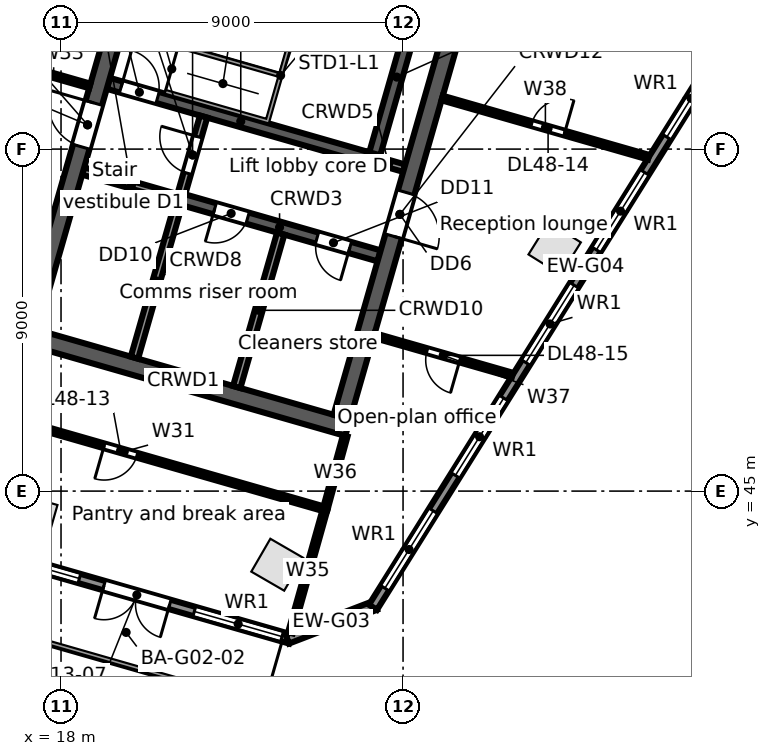
"""IFC4 building model, lengths in metres.
Left out: names, types, materials, properties, quantities, classifications, styles, units other than length and angle.
Written with IfcOpenShell. Run it as: python <this file> out.ifc"""

import sys

from ifc_helpers import new_model, si_unit, direction, frame, frame_2d, origin, origin_2d, place, context, subcontext, project, spatial, rectangle, extrude, element, fill, save


model = new_model("IFC4")
c1 = context("Model", 3, precision=1e-05, world=origin(), true_north=direction((0.0, 1.0)))
c2 = subcontext(c1, "Body", "Model", "MODEL_VIEW")
j1 = project(units=[si_unit("LENGTHUNIT", "METRE"), si_unit("PLANEANGLEUNIT", "RADIAN")], contexts=[c1])
p1 = place(None, origin())
s1 = spatial("IfcSite", under=j1, at=p1, CompositionType="ELEMENT")
p2 = place(p1, origin())
s2 = spatial("IfcBuilding", under=s1, at=p2, CompositionType="ELEMENT")
p3 = place(p2, frame((0.0, 0.0, 227.0)))
s3 = spatial("IfcBuildingStorey", under=s2, at=p3, CompositionType="ELEMENT", Elevation=227.0)
for number, where, z_axis, x_axis in (
    (1, (17.288, 44.291, 0.0), (0.0, 0.0, 1.0), (0.961, -0.276, 0.0)),
    (2, (23.69, 43.063, 0.0), (0.0, 0.0, 1.0), (-0.865, 0.501, 0.0)),
    (3, (30.99, 51.386, 0.0), (0.0, 0.0, 1.0), (0.53, 0.848, 0.0)),
):
    element("IfcColumn", number, at=place(p3, frame(where, z_axis=z_axis, x_axis=x_axis)), inside=s3, PredefinedType="COLUMN", context=c2, shape_type="SweptSolid", body=[
        extrude(rectangle(XDim=1.0, YDim=1.0, at=origin_2d()), origin(), (0.0, 0.0, 1.0), 3.9),
    ])
p4 = place(p3, frame((24.034, 41.108, 0.0), z_axis=(0.0, 0.0, 1.0), x_axis=(-0.96126060691, 0.275641153683, 0.0)))
e4 = element("IfcWall", 4, at=p4, inside=s3, PredefinedType="STANDARD", context=c2, shape_type="SweptSolid", body=[
    extrude(rectangle(XDim=24.951, YDim=0.25, at=frame_2d((12.475, 0.0))), origin(), (0.0, 0.0, 1.0), 3.55),
])
p5 = place(p4, frame((22.416, 0.0, 0.8)))
e5 = element("IfcOpeningElement", 5, at=p5, cuts=e4, PredefinedType="OPENING", context=c2, shape_type="SweptSolid", body=[
    extrude(rectangle(XDim=2.4, YDim=2.2, at=frame_2d((1.2, 1.1))), frame((0.0, 0.135, 0.0), z_axis=(0.0, -1.0, 0.0), x_axis=(1.0, 0.0, 0.0)), (0.0, 0.0, 1.0), 0.27),
])
p6 = place(p4, frame((19.643, 0.0, 0.8)))
e6 = element("IfcOpeningElement", 6, at=p6, cuts=e4, PredefinedType="OPENING", context=c2, shape_type="SweptSolid", body=[
    extrude(rectangle(XDim=2.4, YDim=2.2, at=frame_2d((1.2, 1.1))), frame((0.0, 0.135, 0.0), z_axis=(0.0, -1.0, 0.0), x_axis=(1.0, 0.0, 0.0)), (0.0, 0.0, 1.0), 0.27),
])
p7 = place(p4, frame((16.869, 0.0, 0.8)))
e7 = element("IfcOpeningElement", 7, at=p7, cuts=e4, PredefinedType="OPENING", context=c2, shape_type="SweptSolid", body=[
    extrude(rectangle(XDim=2.4, YDim=2.2, at=frame_2d((1.2, 1.1))), frame((0.0, 0.135, 0.0), z_axis=(0.0, -1.0, 0.0), x_axis=(1.0, 0.0, 0.0)), (0.0, 0.0, 1.0), 0.27),
])
p8 = place(p4, frame((14.096, 0.0, 0.8)))
e8 = element("IfcOpeningElement", 8, at=p8, cuts=e4, PredefinedType="OPENING", context=c2, shape_type="SweptSolid", body=[
    extrude(rectangle(XDim=2.4, YDim=2.2, at=frame_2d((1.2, 1.1))), frame((0.0, 0.135, 0.0), z_axis=(0.0, -1.0, 0.0), x_axis=(1.0, 0.0, 0.0)), (0.0, 0.0, 1.0), 0.27),
])
p9 = place(p4, frame((11.622, 0.0, 0.0)))
e9 = element("IfcOpeningElement", 9, at=p9, cuts=e4, PredefinedType="OPENING", context=c2, shape_type="SweptSolid", body=[
    extrude(rectangle(XDim=1.8, YDim=2.4, at=frame_2d((0.9, 1.2))), frame((0.0, 0.135, 0.0), z_axis=(0.0, -1.0, 0.0), x_axis=(1.0, 0.0, 0.0)), (0.0, 0.0, 1.0), 0.27),
])
p10 = place(p4, frame((8.549, 0.0, 0.8)))
e10 = element("IfcOpeningElement", 10, at=p10, cuts=e4, PredefinedType="OPENING", context=c2, shape_type="SweptSolid", body=[
    extrude(rectangle(XDim=2.4, YDim=2.2, at=frame_2d((1.2, 1.1))), frame((0.0, 0.135, 0.0), z_axis=(0.0, -1.0, 0.0), x_axis=(1.0, 0.0, 0.0)), (0.0, 0.0, 1.0), 0.27),
])
p11 = place(p4, frame((5.775, 0.0, 0.8)))
e11 = element("IfcOpeningElement", 11, at=p11, cuts=e4, PredefinedType="OPENING", context=c2, shape_type="SweptSolid", body=[
    extrude(rectangle(XDim=2.4, YDim=2.2, at=frame_2d((1.2, 1.1))), frame((0.0, 0.135, 0.0), z_axis=(0.0, -1.0, 0.0), x_axis=(1.0, 0.0, 0.0)), (0.0, 0.0, 1.0), 0.27),
])
p12 = place(p4, frame((3.302, 0.0, 0.0)))
e12 = element("IfcOpeningElement", 12, at=p12, cuts=e4, PredefinedType="OPENING", context=c2, shape_type="SweptSolid", body=[
    extrude(rectangle(XDim=1.8, YDim=2.4, at=frame_2d((0.9, 1.2))), frame((0.0, 0.135, 0.0), z_axis=(0.0, -1.0, 0.0), x_axis=(1.0, 0.0, 0.0)), (0.0, 0.0, 1.0), 0.27),
])
p13 = place(p4, frame((0.229, 0.0, 0.8)))
e13 = element("IfcOpeningElement", 13, at=p13, cuts=e4, PredefinedType="OPENING", context=c2, shape_type="SweptSolid", body=[
    extrude(rectangle(XDim=2.4, YDim=2.2, at=frame_2d((1.2, 1.1))), frame((0.0, 0.135, 0.0), z_axis=(0.0, -1.0, 0.0), x_axis=(1.0, 0.0, 0.0)), (0.0, 0.0, 1.0), 0.27),
])
p14 = place(p3, frame((26.27, 41.993, 0.0), z_axis=(0.0, 0.0, 1.0), x_axis=(-0.933573798066, -0.358385216722, 0.0)))
e14 = element("IfcWall", 14, at=p14, inside=s3, PredefinedType="STANDARD", context=c2, shape_type="SweptSolid", body=[
    extrude(rectangle(XDim=2.48, YDim=0.25, at=frame_2d((1.24, 0.0))), origin(), (0.0, 0.0, 1.0), 3.55),
])
p15 = place(p3, frame((37.392, 59.84, 0.0), z_axis=(0.0, 0.0, 1.0), x_axis=(-0.529919909431, -0.848047692992, 0.0)))
e15 = element("IfcWall", 15, at=p15, inside=s3, PredefinedType="STANDARD", context=c2, shape_type="SweptSolid", body=[
    extrude(rectangle(XDim=21.104, YDim=0.25, at=frame_2d((10.552, 0.0))), origin(), (0.0, 0.0, 1.0), 3.55),
])
p16 = place(p15, frame((18.112, 0.0, 0.8)))
e16 = element("IfcOpeningElement", 16, at=p16, cuts=e15, PredefinedType="OPENING", context=c2, shape_type="SweptSolid", body=[
    extrude(rectangle(XDim=2.4, YDim=2.2, at=frame_2d((1.2, 1.1))), frame((0.0, 0.135, 0.0), z_axis=(0.0, -1.0, 0.0), x_axis=(1.0, 0.0, 0.0)), (0.0, 0.0, 1.0), 0.27),
])
p17 = place(p15, frame((14.612, 0.0, 0.8)))
e17 = element("IfcOpeningElement", 17, at=p17, cuts=e15, PredefinedType="OPENING", context=c2, shape_type="SweptSolid", body=[
    extrude(rectangle(XDim=2.4, YDim=2.2, at=frame_2d((1.2, 1.1))), frame((0.0, 0.135, 0.0), z_axis=(0.0, -1.0, 0.0), x_axis=(1.0, 0.0, 0.0)), (0.0, 0.0, 1.0), 0.27),
])
p18 = place(p15, frame((11.112, 0.0, 0.8)))
e18 = element("IfcOpeningElement", 18, at=p18, cuts=e15, PredefinedType="OPENING", context=c2, shape_type="SweptSolid", body=[
    extrude(rectangle(XDim=2.4, YDim=2.2, at=frame_2d((1.2, 1.1))), frame((0.0, 0.135, 0.0), z_axis=(0.0, -1.0, 0.0), x_axis=(1.0, 0.0, 0.0)), (0.0, 0.0, 1.0), 0.27),
])
p19 = place(p15, frame((7.612, 0.0, 0.8)))
e19 = element("IfcOpeningElement", 19, at=p19, cuts=e15, PredefinedType="OPENING", context=c2, shape_type="SweptSolid", body=[
    extrude(rectangle(XDim=2.4, YDim=2.2, at=frame_2d((1.2, 1.1))), frame((0.0, 0.135, 0.0), z_axis=(0.0, -1.0, 0.0), x_axis=(1.0, 0.0, 0.0)), (0.0, 0.0, 1.0), 0.27),
])
p20 = place(p15, frame((4.112, 0.0, 0.8)))
e20 = element("IfcOpeningElement", 20, at=p20, cuts=e15, PredefinedType="OPENING", context=c2, shape_type="SweptSolid", body=[
    extrude(rectangle(XDim=2.4, YDim=2.2, at=frame_2d((1.2, 1.1))), frame((0.0, 0.135, 0.0), z_axis=(0.0, -1.0, 0.0), x_axis=(1.0, 0.0, 0.0)), (0.0, 0.0, 1.0), 0.27),
])
p21 = place(p15, frame((0.612, 0.0, 0.8)))
e21 = element("IfcOpeningElement", 21, at=p21, cuts=e15, PredefinedType="OPENING", context=c2, shape_type="SweptSolid", body=[
    extrude(rectangle(XDim=2.4, YDim=2.2, at=frame_2d((1.2, 1.1))), frame((0.0, 0.135, 0.0), z_axis=(0.0, -1.0, 0.0), x_axis=(1.0, 0.0, 0.0)), (0.0, 0.0, 1.0), 0.27),
])
p22 = place(p3, frame((16.89, 49.149, 0.0), z_axis=(0.0, 0.0, 1.0), x_axis=(0.96126248289, -0.275634611374, 0.0)))
e22 = element("IfcWall", 22, at=p22, inside=s3, PredefinedType="SOLIDWALL", context=c2, shape_type="SweptSolid", body=[
    extrude(rectangle(XDim=9.0, YDim=0.45, at=frame_2d((4.5, 0.0))), origin(), (0.0, 0.0, 1.0), 3.55),
])
p23 = place(p3, frame((18.583, 53.423, 0.0), z_axis=(0.0, 0.0, 1.0), x_axis=(0.961259287968, -0.275645753268, 0.0)))
e23 = element("IfcWall", 23, at=p23, inside=s3, PredefinedType="SOLIDWALL", context=c2, shape_type="SweptSolid", body=[
    extrude(rectangle(XDim=2.65, YDim=0.2, at=frame_2d((1.325, 0.0))), origin(), (0.0, 0.0, 1.0), 3.55),
])
p24 = place(p3, frame((21.131, 52.692, 0.0), z_axis=(0.0, 0.0, 1.0), x_axis=(0.961261488075, -0.275638080722, 0.0)))
e24 = element("IfcWall", 24, at=p24, inside=s3, PredefinedType="SOLIDWALL", context=c2, shape_type="SweptSolid", body=[
    extrude(rectangle(XDim=5.45, YDim=0.3, at=frame_2d((2.725, 0.0))), origin(), (0.0, 0.0, 1.0), 3.55),
])
p25 = place(p24, frame((0.95, 0.0, 0.0)))
e25 = element("IfcOpeningElement", 25, at=p25, cuts=e24, PredefinedType="OPENING", context=c2, shape_type="SweptSolid", body=[
    extrude(rectangle(XDim=0.9, YDim=2.1, at=frame_2d((0.45, 1.05))), frame((0.0, 0.16, 0.0), z_axis=(0.0, -1.0, 0.0), x_axis=(1.0, 0.0, 0.0)), (0.0, 0.0, 1.0), 0.32),
])
p26 = place(p24, frame((3.75, 0.0, 0.0)))
e26 = element("IfcOpeningElement", 26, at=p26, cuts=e24, PredefinedType="OPENING", context=c2, shape_type="SweptSolid", body=[
    extrude(rectangle(XDim=0.9, YDim=2.1, at=frame_2d((0.45, 1.05))), frame((0.0, 0.16, 0.0), z_axis=(0.0, -1.0, 0.0), x_axis=(1.0, 0.0, 0.0)), (0.0, 0.0, 1.0), 0.32),
])
p27 = place(p3, frame((19.245, 55.73, 0.0), z_axis=(0.0, 0.0, 1.0), x_axis=(0.961263007877, -0.275632780503, 0.0)))
e27 = element("IfcWall", 27, at=p27, inside=s3, PredefinedType="SOLIDWALL", context=c2, shape_type="SweptSolid", body=[
    extrude(rectangle(XDim=7.25, YDim=0.3, at=frame_2d((3.625, 0.0))), origin(), (0.0, 0.0, 1.0), 3.55),
])
p28 = place(p27, frame((0.35, 0.0, 0.0)))
e28 = element("IfcOpeningElement", 28, at=p28, cuts=e27, PredefinedType="OPENING", context=c2, shape_type="SweptSolid", body=[
    extrude(rectangle(XDim=1.0, YDim=2.1, at=frame_2d((0.5, 1.05))), frame((0.0, 0.16, 0.0), z_axis=(0.0, -1.0, 0.0), x_axis=(1.0, 0.0, 0.0)), (0.0, 0.0, 1.0), 0.32),
])
p29 = place(p3, frame((26.214, 53.732, 0.0), z_axis=(0.0, 0.0, 1.0), x_axis=(0.961241665642, -0.275707200184, 0.0)))
e29 = element("IfcWall", 29, at=p29, inside=s3, PredefinedType="SOLIDWALL", context=c2, shape_type="SweptSolid", body=[
    extrude(rectangle(XDim=0.85, YDim=0.2, at=frame_2d((0.425, 0.0))), origin(), (0.0, 0.0, 1.0), 3.55),
])
p30 = place(p3, frame((17.168, 49.303, 0.0), z_axis=(0.0, 0.0, 1.0), x_axis=(0.275638974822, 0.961261231695, 0.0)))
e30 = element("IfcWall", 30, at=p30, inside=s3, PredefinedType="SOLIDWALL", context=c2, shape_type="SweptSolid", body=[
    extrude(rectangle(XDim=11.1, YDim=0.45, at=frame_2d((5.55, 0.0))), origin(), (0.0, 0.0, 1.0), 3.55),
])
p31 = place(p30, frame((4.95, 0.0, 0.0)))
e31 = element("IfcOpeningElement", 31, at=p31, cuts=e30, PredefinedType="OPENING", context=c2, shape_type="SweptSolid", body=[
    extrude(rectangle(XDim=1.2, YDim=2.1, at=frame_2d((0.6, 1.05))), frame((0.0, 0.235, 0.0), z_axis=(0.0, -1.0, 0.0), x_axis=(1.0, 0.0, 0.0)), (0.0, 0.0, 1.0), 0.47),
])
p32 = place(p3, frame((19.932, 48.511, 0.0), z_axis=(0.0, 0.0, 1.0), x_axis=(0.275642273411, 0.961260285827, 0.0)))
e32 = element("IfcWall", 32, at=p32, inside=s3, PredefinedType="SOLIDWALL", context=c2, shape_type="SweptSolid", body=[
    extrude(rectangle(XDim=4.2, YDim=0.2, at=frame_2d((2.1, 0.0))), origin(), (0.0, 0.0, 1.0), 3.55),
])
p33 = place(p3, frame((21.172, 52.837, 0.0), z_axis=(0.0, 0.0, 1.0), x_axis=(0.275657676022, 0.961255868981, 0.0)))
e33 = element("IfcWall", 33, at=p33, inside=s3, PredefinedType="PARTITIONING", context=c2, shape_type="SweptSolid", body=[
    extrude(rectangle(XDim=2.1, YDim=0.2, at=frame_2d((1.05, 0.0))), origin(), (0.0, 0.0, 1.0), 3.55),
])
p34 = place(p33, frame((0.55, 0.0, 0.0)))
e34 = element("IfcOpeningElement", 34, at=p34, cuts=e33, PredefinedType="OPENING", context=c2, shape_type="SweptSolid", body=[
    extrude(rectangle(XDim=1.0, YDim=2.1, at=frame_2d((0.5, 1.05))), frame((0.0, 0.11, 0.0), z_axis=(0.0, -1.0, 0.0), x_axis=(1.0, 0.0, 0.0)), (0.0, 0.0, 1.0), 0.22),
])
p35 = place(p3, frame((22.623, 47.739, 0.0), z_axis=(0.0, 0.0, 1.0), x_axis=(0.275642273411, 0.961260285827, 0.0)))
e35 = element("IfcWall", 35, at=p35, inside=s3, PredefinedType="PARTITIONING", context=c2, shape_type="SweptSolid", body=[
    extrude(rectangle(XDim=4.2, YDim=0.2, at=frame_2d((2.1, 0.0))), origin(), (0.0, 0.0, 1.0), 3.55),
])
p36 = place(p3, frame((26.256, 53.876, 0.0), z_axis=(0.0, 0.0, 1.0), x_axis=(0.275588560745, 0.96127568636, 0.0)))
e36 = element("IfcWall", 36, at=p36, inside=s3, PredefinedType="SOLIDWALL", context=c2, shape_type="SweptSolid", body=[
    extrude(rectangle(XDim=4.2, YDim=0.3, at=frame_2d((2.1, 0.0))), origin(), (0.0, 0.0, 1.0), 3.55),
])
p37 = place(p3, frame((25.387, 46.947, 0.0), z_axis=(0.0, 0.0, 1.0), x_axis=(0.275638974822, 0.961261231695, 0.0)))
e37 = element("IfcWall", 37, at=p37, inside=s3, PredefinedType="SOLIDWALL", context=c2, shape_type="SweptSolid", body=[
    extrude(rectangle(XDim=11.1, YDim=0.45, at=frame_2d((5.55, 0.0))), origin(), (0.0, 0.0, 1.0), 3.55),
])
p38 = place(p37, frame((4.95, 0.0, 0.0)))
e38 = element("IfcOpeningElement", 38, at=p38, cuts=e37, PredefinedType="OPENING", context=c2, shape_type="SweptSolid", body=[
    extrude(rectangle(XDim=1.2, YDim=2.1, at=frame_2d((0.6, 1.05))), frame((0.0, 0.235, 0.0), z_axis=(0.0, -1.0, 0.0), x_axis=(1.0, 0.0, 0.0)), (0.0, 0.0, 1.0), 0.47),
])
p39 = place(p3, frame((14.377, 47.555, 0.0), z_axis=(0.0, 0.0, 1.0), x_axis=(0.961263044958, -0.275632651182, 0.0)))
e39 = element("IfcWall", 39, at=p39, inside=s3, PredefinedType="PARTITIONING", context=c2, shape_type="SweptSolid", body=[
    extrude(rectangle(XDim=11.0, YDim=0.125, at=frame_2d((5.5, 0.0))), origin(), (0.0, 0.0, 1.0), 2.822),
])
p40 = place(p39, frame((4.95, 0.0, 0.0)))
e40 = element("IfcOpeningElement", 40, at=p40, cuts=e39, PredefinedType="OPENING", context=c2, shape_type="SweptSolid", body=[
    extrude(rectangle(XDim=0.9, YDim=2.1, at=frame_2d((0.45, 1.05))), frame((0.0, 0.073, 0.0), z_axis=(0.0, -1.0, 0.0), x_axis=(1.0, 0.0, 0.0)), (0.0, 0.0, 1.0), 0.145),
])
p41 = place(p3, frame((16.857, 56.206, 0.0), z_axis=(0.0, 0.0, 1.0), x_axis=(0.961383985066, -0.275210525341, 0.0)))
e41 = element("IfcWall", 41, at=p41, inside=s3, PredefinedType="PARTITIONING", context=c2, shape_type="SweptSolid", body=[
    extrude(rectangle(XDim=1.977, YDim=0.125, at=frame_2d((0.988, 0.0))), origin(), (0.0, 0.0, 1.0), 3.55),
])
p42 = place(p3, frame((24.036, 41.27, 0.0), z_axis=(0.0, 0.0, 1.0), x_axis=(0.270787421954, 0.962639170256, 0.0)))
e42 = element("IfcWall", 42, at=p42, inside=s3, PredefinedType="PARTITIONING", context=c2, shape_type="SweptSolid", body=[
    extrude(rectangle(XDim=3.379, YDim=0.125, at=frame_2d((1.689, 0.0))), origin(), (0.0, 0.0, 1.0), 2.822),
])
p43 = place(p3, frame((24.951, 44.523, 0.0), z_axis=(0.0, 0.0, 1.0), x_axis=(0.264046927145, 0.964509834198, 0.0)))
e43 = element("IfcWall", 43, at=p43, inside=s3, PredefinedType="PARTITIONING", context=c2, shape_type="SweptSolid", body=[
    extrude(rectangle(XDim=2.0, YDim=0.125, at=frame_2d((1.0, 0.0))), origin(), (0.0, 0.0, 1.0), 2.822),
])
p44 = place(p3, frame((26.237, 49.096, 0.0), z_axis=(0.0, 0.0, 1.0), x_axis=(0.961285271066, -0.275555126304, 0.0)))
e44 = element("IfcWall", 44, at=p44, inside=s3, PredefinedType="PARTITIONING", context=c2, shape_type="SweptSolid", body=[
    extrude(rectangle(XDim=3.789, YDim=0.125, at=frame_2d((1.894, 0.0))), origin(), (0.0, 0.0, 1.0), 2.822),
])
p45 = place(p44, frame((1.45, 0.0, 0.0)))
e45 = element("IfcOpeningElement", 45, at=p45, cuts=e44, PredefinedType="OPENING", context=c2, shape_type="SweptSolid", body=[
    extrude(rectangle(XDim=0.9, YDim=2.1, at=frame_2d((0.45, 1.05))), frame((0.0, 0.073, 0.0), z_axis=(0.0, -1.0, 0.0), x_axis=(1.0, 0.0, 0.0)), (0.0, 0.0, 1.0), 0.145),
])
p46 = place(p3, frame((28.029, 55.344, 0.0), z_axis=(0.0, 0.0, 1.0), x_axis=(0.961249621014, -0.275679462603, 0.0)))
e46 = element("IfcWall", 46, at=p46, inside=s3, PredefinedType="PARTITIONING", context=c2, shape_type="SweptSolid", body=[
    extrude(rectangle(XDim=5.652, YDim=0.125, at=frame_2d((2.826, 0.0))), origin(), (0.0, 0.0, 1.0), 2.83),
])
p47 = place(p46, frame((2.45, 0.0, 0.0)))
e47 = element("IfcOpeningElement", 47, at=p47, cuts=e46, PredefinedType="OPENING", context=c2, shape_type="SweptSolid", body=[
    extrude(rectangle(XDim=0.9, YDim=2.1, at=frame_2d((0.45, 1.05))), frame((0.0, 0.073, 0.0), z_axis=(0.0, -1.0, 0.0), x_axis=(1.0, 0.0, 0.0)), (0.0, 0.0, 1.0), 0.145),
])
p48 = place(p11, origin())
e48 = element("IfcWindow", 48, at=p48, inside=s3, PartitioningType="SINGLE_PANEL", PredefinedType="WINDOW", context=c2, shape_type="SweptSolid", body=[
    extrude(rectangle(XDim=2.4, YDim=2.2, at=frame_2d((1.2, 1.1))), frame((0.0, 0.03, 0.0), z_axis=(0.0, -1.0, 0.0), x_axis=(1.0, 0.0, 0.0)), (0.0, 0.0, 1.0), 0.06),
])
fill(e11, e48)
p49 = place(p12, origin())
e49 = element("IfcDoor", 49, at=p49, inside=s3, OperationType="DOUBLE_DOOR_SINGLE_SWING", PredefinedType="DOOR", context=c2, shape_type="SweptSolid", body=[
    extrude(rectangle(XDim=1.8, YDim=2.4, at=frame_2d((0.9, 1.2))), frame((0.0, 0.025, 0.0), z_axis=(0.0, -1.0, 0.0), x_axis=(1.0, 0.0, 0.0)), (0.0, 0.0, 1.0), 0.05),
])
fill(e12, e49)
p50 = place(p13, origin())
e50 = element("IfcWindow", 50, at=p50, inside=s3, PartitioningType="SINGLE_PANEL", PredefinedType="WINDOW", context=c2, shape_type="SweptSolid", body=[
    extrude(rectangle(XDim=2.4, YDim=2.2, at=frame_2d((1.2, 1.1))), frame((0.0, 0.03, 0.0), z_axis=(0.0, -1.0, 0.0), x_axis=(1.0, 0.0, 0.0)), (0.0, 0.0, 1.0), 0.06),
])
fill(e13, e50)
p51 = place(p16, origin())
e51 = element("IfcWindow", 51, at=p51, inside=s3, PartitioningType="SINGLE_PANEL", PredefinedType="WINDOW", context=c2, shape_type="SweptSolid", body=[
    extrude(rectangle(XDim=2.4, YDim=2.2, at=frame_2d((1.2, 1.1))), frame((0.0, 0.03, 0.0), z_axis=(0.0, -1.0, 0.0), x_axis=(1.0, 0.0, 0.0)), (0.0, 0.0, 1.0), 0.06),
])
fill(e16, e51)
p52 = place(p17, origin())
e52 = element("IfcWindow", 52, at=p52, inside=s3, PartitioningType="SINGLE_PANEL", PredefinedType="WINDOW", context=c2, shape_type="SweptSolid", body=[
    extrude(rectangle(XDim=2.4, YDim=2.2, at=frame_2d((1.2, 1.1))), frame((0.0, 0.03, 0.0), z_axis=(0.0, -1.0, 0.0), x_axis=(1.0, 0.0, 0.0)), (0.0, 0.0, 1.0), 0.06),
])
fill(e17, e52)
p53 = place(p18, origin())
e53 = element("IfcWindow", 53, at=p53, inside=s3, PartitioningType="SINGLE_PANEL", PredefinedType="WINDOW", context=c2, shape_type="SweptSolid", body=[
    extrude(rectangle(XDim=2.4, YDim=2.2, at=frame_2d((1.2, 1.1))), frame((0.0, 0.03, 0.0), z_axis=(0.0, -1.0, 0.0), x_axis=(1.0, 0.0, 0.0)), (0.0, 0.0, 1.0), 0.06),
])
fill(e18, e53)
p54 = place(p19, origin())
e54 = element("IfcWindow", 54, at=p54, inside=s3, PartitioningType="SINGLE_PANEL", PredefinedType="WINDOW", context=c2, shape_type="SweptSolid", body=[
    extrude(rectangle(XDim=2.4, YDim=2.2, at=frame_2d((1.2, 1.1))), frame((0.0, 0.03, 0.0), z_axis=(0.0, -1.0, 0.0), x_axis=(1.0, 0.0, 0.0)), (0.0, 0.0, 1.0), 0.06),
])
fill(e19, e54)
p55 = place(p20, origin())
e55 = element("IfcWindow", 55, at=p55, inside=s3, PartitioningType="SINGLE_PANEL", PredefinedType="WINDOW", context=c2, shape_type="SweptSolid", body=[
    extrude(rectangle(XDim=2.4, YDim=2.2, at=frame_2d((1.2, 1.1))), frame((0.0, 0.03, 0.0), z_axis=(0.0, -1.0, 0.0), x_axis=(1.0, 0.0, 0.0)), (0.0, 0.0, 1.0), 0.06),
])
fill(e20, e55)
p56 = place(p28, origin())
e56 = element("IfcDoor", 56, at=p56, inside=s3, OperationType="SINGLE_SWING_LEFT", PredefinedType="DOOR", context=c2, shape_type="SweptSolid", body=[
    extrude(rectangle(XDim=1.0, YDim=2.1, at=frame_2d((0.5, 1.05))), frame((0.0, 0.025, 0.0), z_axis=(0.0, -1.0, 0.0), x_axis=(1.0, 0.0, 0.0)), (0.0, 0.0, 1.0), 0.05),
])
fill(e28, e56)
p57 = place(p34, origin())
e57 = element("IfcDoor", 57, at=p57, inside=s3, OperationType="SINGLE_SWING_RIGHT", PredefinedType="DOOR", context=c2, shape_type="SweptSolid", body=[
    extrude(rectangle(XDim=1.0, YDim=2.1, at=frame_2d((0.5, 1.05))), frame((0.0, 0.025, 0.0), z_axis=(0.0, -1.0, 0.0), x_axis=(1.0, 0.0, 0.0)), (0.0, 0.0, 1.0), 0.05),
])
fill(e34, e57)
p58 = place(p31, origin())
e58 = element("IfcDoor", 58, at=p58, inside=s3, OperationType="SINGLE_SWING_RIGHT", PredefinedType="DOOR", context=c2, shape_type="SweptSolid", body=[
    extrude(rectangle(XDim=1.2, YDim=2.1, at=frame_2d((0.6, 1.05))), frame((0.0, 0.025, 0.0), z_axis=(0.0, -1.0, 0.0), x_axis=(1.0, 0.0, 0.0)), (0.0, 0.0, 1.0), 0.05),
])
fill(e31, e58)
p59 = place(p38, frame((1.2, 0.0, 0.0), z_axis=(0.0, 0.0, 1.0), x_axis=(-1.0, 0.0, 0.0)))
e59 = element("IfcDoor", 59, at=p59, inside=s3, OperationType="SINGLE_SWING_RIGHT", PredefinedType="DOOR", context=c2, shape_type="SweptSolid", body=[
    extrude(rectangle(XDim=1.2, YDim=2.1, at=frame_2d((0.6, 1.05))), frame((0.0, 0.025, 0.0), z_axis=(0.0, -1.0, 0.0), x_axis=(1.0, 0.0, 0.0)), (0.0, 0.0, 1.0), 0.05),
])
fill(e38, e59)
p60 = place(p25, frame((0.9, 0.0, 0.0), z_axis=(0.0, 0.0, 1.0), x_axis=(-1.0, 0.0, 0.0)))
e60 = element("IfcDoor", 60, at=p60, inside=s3, OperationType="SINGLE_SWING_RIGHT", PredefinedType="DOOR", context=c2, shape_type="SweptSolid", body=[
    extrude(rectangle(XDim=0.9, YDim=2.1, at=frame_2d((0.45, 1.05))), frame((0.0, 0.025, 0.0), z_axis=(0.0, -1.0, 0.0), x_axis=(1.0, 0.0, 0.0)), (0.0, 0.0, 1.0), 0.05),
])
fill(e25, e60)
p61 = place(p26, frame((0.9, 0.0, 0.0), z_axis=(0.0, 0.0, 1.0), x_axis=(-1.0, 0.0, 0.0)))
e61 = element("IfcDoor", 61, at=p61, inside=s3, OperationType="SINGLE_SWING_LEFT", PredefinedType="DOOR", context=c2, shape_type="SweptSolid", body=[
    extrude(rectangle(XDim=0.9, YDim=2.1, at=frame_2d((0.45, 1.05))), frame((0.0, 0.025, 0.0), z_axis=(0.0, -1.0, 0.0), x_axis=(1.0, 0.0, 0.0)), (0.0, 0.0, 1.0), 0.05),
])
fill(e26, e61)
p62 = place(p40, frame((0.9, 0.0, 0.0), z_axis=(0.0, 0.0, 1.0), x_axis=(-1.0, 0.0, 0.0)))
e62 = element("IfcDoor", 62, at=p62, inside=s3, OperationType="SINGLE_SWING_RIGHT", PredefinedType="DOOR", context=c2, shape_type="SweptSolid", body=[
    extrude(rectangle(XDim=0.9, YDim=2.1, at=frame_2d((0.45, 1.05))), frame((0.0, 0.025, 0.0), z_axis=(0.0, -1.0, 0.0), x_axis=(1.0, 0.0, 0.0)), (0.0, 0.0, 1.0), 0.05),
])
fill(e40, e62)
p63 = place(p47, origin())
e63 = element("IfcDoor", 63, at=p63, inside=s3, OperationType="SINGLE_SWING_RIGHT", PredefinedType="DOOR", context=c2, shape_type="SweptSolid", body=[
    extrude(rectangle(XDim=0.9, YDim=2.1, at=frame_2d((0.45, 1.05))), frame((0.0, 0.025, 0.0), z_axis=(0.0, -1.0, 0.0), x_axis=(1.0, 0.0, 0.0)), (0.0, 0.0, 1.0), 0.05),
])
fill(e47, e63)
p64 = place(p45, frame((0.9, 0.0, 0.0), z_axis=(0.0, 0.0, 1.0), x_axis=(-1.0, 0.0, 0.0)))
e64 = element("IfcDoor", 64, at=p64, inside=s3, OperationType="SINGLE_SWING_LEFT", PredefinedType="DOOR", context=c2, shape_type="SweptSolid", body=[
    extrude(rectangle(XDim=0.9, YDim=2.1, at=frame_2d((0.45, 1.05))), frame((0.0, 0.025, 0.0), z_axis=(0.0, -1.0, 0.0), x_axis=(1.0, 0.0, 0.0)), (0.0, 0.0, 1.0), 0.05),
])
fill(e45, e64)
save(model, sys.argv[1])
